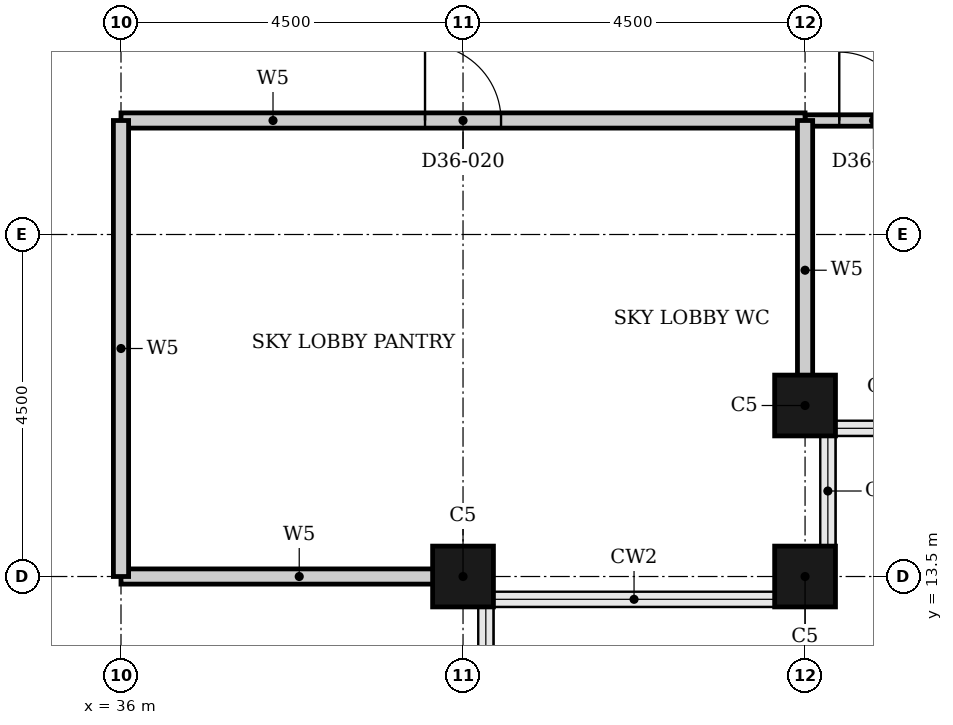
"""IFC4 building model, lengths in metres.
Left out: names, types, materials, properties, quantities, classifications, styles, units other than length and angle.
Written with IfcOpenShell. Run it as: python <this file> out.ifc"""

import sys

from ifc_helpers import new_model, si_unit, direction, frame, frame_2d, origin, origin_2d, place, context, subcontext, project, spatial, rectangle, hollow_rectangle, extrude, element, fill, save


model = new_model("IFC4")
c1 = context("Model", 3, precision=1e-05, world=origin(), true_north=direction((0.0, 1.0)))
c2 = subcontext(c1, "Body", "Model", "MODEL_VIEW")
j1 = project(units=[si_unit("LENGTHUNIT", "METRE"), si_unit("PLANEANGLEUNIT", "RADIAN")], contexts=[c1])
p1 = place(None, origin())
s1 = spatial("IfcSite", under=j1, at=p1, CompositionType="ELEMENT")
p2 = place(p1, origin())
s2 = spatial("IfcBuilding", under=s1, at=p2, CompositionType="ELEMENT")
p3 = place(p2, frame((0.0, 0.0, 145.2)))
s3 = spatial("IfcBuildingStorey", under=s2, at=p3, CompositionType="ELEMENT", Elevation=145.2)
for number, where, z_axis, x_axis in (
    (1, (40.5, 13.5, 0.0), (0.0, 0.0, 1.0), (1.0, 0.0, 0.0)),
    (2, (45.0, 13.5, 0.0), (0.0, 0.0, 1.0), (1.0, 0.0, 0.0)),
    (3, (45.0, 15.75, 0.0), (0.0, 0.0, 1.0), (1.0, 0.0, 0.0)),
):
    element("IfcColumn", number, at=place(p3, frame(where, z_axis=z_axis, x_axis=x_axis)), inside=s3, PredefinedType="COLUMN", context=c2, shape_type="SweptSolid", body=[
        extrude(hollow_rectangle(XDim=0.8, YDim=0.8, WallThickness=0.025, at=origin_2d()), origin(), (0.0, 0.0, 1.0), 5.4),
    ])
p4 = place(p3, frame((45.0, 19.5, 0.0), z_axis=(0.0, 0.0, 1.0), x_axis=(1.0, 0.0, 0.0)))
e4 = element("IfcWall", 4, at=p4, inside=s3, PredefinedType="PARTITIONING", context=c2, shape_type="SweptSolid", body=[
    extrude(rectangle(XDim=4.5, YDim=0.15, at=frame_2d((2.25, 0.0))), origin(), (0.0, 0.0, 1.0), 5.1),
])
p5 = place(p4, frame((0.45, 0.0, 0.0)))
e5 = element("IfcOpeningElement", 5, at=p5, cuts=e4, PredefinedType="OPENING", context=c2, shape_type="SweptSolid", body=[
    extrude(rectangle(XDim=0.9, YDim=2.1, at=frame_2d((0.45, 1.05))), frame((0.0, 0.085, 0.0), z_axis=(0.0, -1.0, 0.0), x_axis=(1.0, 0.0, 0.0)), (0.0, 0.0, 1.0), 0.17),
])
p6 = place(p3, frame((36.0, 13.5, 0.0), z_axis=(0.0, 0.0, 1.0), x_axis=(1.0, 0.0, 0.0)))
e6 = element("IfcWall", 6, at=p6, inside=s3, PredefinedType="PARTITIONING", context=c2, shape_type="SweptSolid", body=[
    extrude(rectangle(XDim=4.69, YDim=0.2, at=frame_2d((2.345, 0.0))), origin(), (0.0, 0.0, 1.0), 4.18),
])
p7 = place(p3, frame((36.0, 19.5, 0.0), z_axis=(0.0, 0.0, 1.0), x_axis=(1.0, 0.0, 0.0)))
e7 = element("IfcWall", 7, at=p7, inside=s3, PredefinedType="PARTITIONING", context=c2, shape_type="SweptSolid", body=[
    extrude(rectangle(XDim=9.0, YDim=0.2, at=frame_2d((4.5, 0.0))), origin(), (0.0, 0.0, 1.0), 5.1),
])
p8 = place(p7, frame((4.0, 0.0, 0.0)))
e8 = element("IfcOpeningElement", 8, at=p8, cuts=e7, PredefinedType="OPENING", context=c2, shape_type="SweptSolid", body=[
    extrude(rectangle(XDim=1.0, YDim=2.1, at=frame_2d((0.5, 1.05))), frame((0.0, 0.11, 0.0), z_axis=(0.0, -1.0, 0.0), x_axis=(1.0, 0.0, 0.0)), (0.0, 0.0, 1.0), 0.22),
])
p9 = place(p3, frame((36.0, 13.5, 0.0), z_axis=(0.0, 0.0, 1.0), x_axis=(0.0, 1.0, 0.0)))
e9 = element("IfcWall", 9, at=p9, inside=s3, PredefinedType="PARTITIONING", context=c2, shape_type="SweptSolid", body=[
    extrude(rectangle(XDim=6.0, YDim=0.2, at=frame_2d((3.0, 0.0))), origin(), (0.0, 0.0, 1.0), 5.1),
])
p10 = place(p3, frame((45.0, 15.56, 0.0), z_axis=(0.0, 0.0, 1.0), x_axis=(0.0, 1.0, 0.0)))
e10 = element("IfcWall", 10, at=p10, inside=s3, PredefinedType="PARTITIONING", context=c2, shape_type="SweptSolid", body=[
    extrude(rectangle(XDim=3.94, YDim=0.2, at=frame_2d((1.97, 0.0))), origin(), (0.0, 0.0, 1.0), 5.1),
])
p11 = place(p8, origin())
e11 = element("IfcDoor", 11, at=p11, inside=s3, OperationType="SINGLE_SWING_LEFT", PredefinedType="DOOR", context=c2, shape_type="SweptSolid", body=[
    extrude(rectangle(XDim=1.0, YDim=2.1, at=frame_2d((0.5, 1.05))), frame((0.0, 0.025, 0.0), z_axis=(0.0, -1.0, 0.0), x_axis=(1.0, 0.0, 0.0)), (0.0, 0.0, 1.0), 0.05),
])
fill(e8, e11)
p12 = place(p5, origin())
e12 = element("IfcDoor", 12, at=p12, inside=s3, OperationType="SINGLE_SWING_LEFT", PredefinedType="DOOR", context=c2, shape_type="SweptSolid", body=[
    extrude(rectangle(XDim=0.9, YDim=2.1, at=frame_2d((0.45, 1.05))), frame((0.0, 0.025, 0.0), z_axis=(0.0, -1.0, 0.0), x_axis=(1.0, 0.0, 0.0)), (0.0, 0.0, 1.0), 0.05),
])
fill(e5, e12)
save(model, sys.argv[1])
